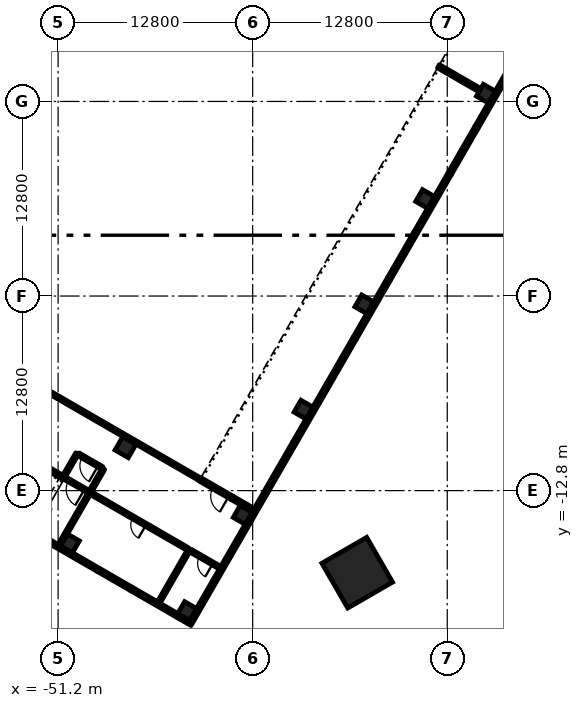
"""IFC4 building model, lengths in metres.
Left out: names, types, materials, properties, quantities, classifications, styles, units other than length and angle.
Written with IfcOpenShell. Run it as: python <this file> out.ifc"""

import sys

from ifc_helpers import new_model, si_unit, direction, frame, frame_2d, origin, origin_2d, place, context, subcontext, project, spatial, rectangle, extrude, element, fill, save


model = new_model("IFC4")
c1 = context("Model", 3, precision=1e-05, world=origin(), true_north=direction((0.0, 1.0)))
c2 = subcontext(c1, "Body", "Model", "MODEL_VIEW")
j1 = project(units=[si_unit("LENGTHUNIT", "METRE"), si_unit("PLANEANGLEUNIT", "RADIAN")], contexts=[c1])
p1 = place(None, origin())
s1 = spatial("IfcSite", under=j1, at=p1, CompositionType="ELEMENT")
p2 = place(p1, origin())
s2 = spatial("IfcBuilding", under=s1, at=p2, CompositionType="ELEMENT")
p3 = place(p2, origin())
s3 = spatial("IfcBuildingStorey", under=s2, at=p3, CompositionType="ELEMENT", Elevation=0.0)
p4 = place(p3, frame((-20.355, 10.597, 2.1), z_axis=(-0.191547193373, -0.34185939919, 0.920022730097), x_axis=(0.872390750772, -0.48880914268, 0.0)))
e1 = element("IfcColumn", 1, at=p4, inside=s3, PredefinedType="COLUMN", context=c2, shape_type="SweptSolid", body=[
    extrude(rectangle(XDim=1.8, YDim=1.6, at=origin_2d()), origin(), (0.0, 0.0, 1.0), 17.608),
])
p5 = place(p2, frame((0.0, 0.0, 11.4)))
s4 = spatial("IfcBuildingStorey", under=s2, at=p5, CompositionType="ELEMENT", Elevation=11.4)
p6 = place(p5, frame((-31.522, -18.199, 0.0), z_axis=(0.0, 0.0, 1.0), x_axis=(-0.866025403784, -0.5, 0.0)))
e2 = element("IfcColumn", 2, at=p6, inside=s4, PredefinedType="COLUMN", context=c2, shape_type="SweptSolid", body=[
    extrude(rectangle(XDim=3.4, YDim=3.4, at=origin_2d()), origin(), (0.0, 0.0, 1.0), 4.8),
])
for number, where, z_axis, x_axis in (
    (3, (-23.061, 13.314, 0.0), (0.0, 0.0, 1.0), (-0.5, -0.866, 0.0)),
    (4, (-27.061, 6.386, 0.0), (0.0, 0.0, 1.0), (-0.5, -0.866, 0.0)),
    (5, (-31.061, -0.542, 0.0), (0.0, 0.0, 1.0), (-0.5, -0.866, 0.0)),
    (6, (-35.061, -7.471, 0.0), (0.0, 0.0, 1.0), (-0.5, -0.866, 0.0)),
    (7, (-39.061, -14.399, 0.0), (0.0, 0.0, 1.0), (-0.5, -0.866, 0.0)),
):
    element("IfcColumn", number, at=place(p5, frame(where, z_axis=z_axis, x_axis=x_axis)), inside=s4, PredefinedType="COLUMN", context=c2, shape_type="SweptSolid", body=[
        extrude(rectangle(XDim=0.9, YDim=0.9, at=origin_2d()), origin(), (0.0, 0.0, 1.0), 4.8),
    ])
p7 = place(p5, frame((-46.768, -9.949, 0.0), z_axis=(0.0, 0.0, 1.0), x_axis=(-0.5, -0.866025403784, 0.0)))
e8 = element("IfcColumn", 8, at=p7, inside=s4, PredefinedType="COLUMN", context=c2, shape_type="SweptSolid", body=[
    extrude(rectangle(XDim=1.0, YDim=1.0, at=origin_2d()), origin(), (0.0, 0.0, 1.0), 4.8),
])
for number, where, z_axis, x_axis in (
    (9, (-42.71, -20.721, 0.0), (0.0, 0.0, 1.0), (-0.5, -0.866, 0.0)),
    (10, (-50.418, -16.271, 0.0), (0.0, 0.0, 1.0), (-0.5, -0.866, 0.0)),
):
    element("IfcColumn", number, at=place(p5, frame(where, z_axis=z_axis, x_axis=x_axis)), inside=s4, PredefinedType="COLUMN", context=c2, shape_type="SweptSolid", body=[
        extrude(rectangle(XDim=0.9, YDim=0.9, at=origin_2d()), origin(), (0.0, 0.0, 1.0), 4.8),
    ])
p8 = place(p5, frame((-21.438, 14.975, 0.0), z_axis=(0.0, 0.0, 1.0), x_axis=(-0.499990139034, -0.866031096941, 0.0)))
e11 = element("IfcWall", 11, at=p8, inside=s4, PredefinedType="SOLIDWALL", context=c2, shape_type="SweptSolid", body=[
    extrude(rectangle(XDim=4.5, YDim=0.25, at=frame_2d((2.25, 0.0))), origin(), (0.0, 0.0, 1.0), 4.5),
])
p9 = place(p5, frame((-23.688, 11.078, 0.0), z_axis=(0.0, 0.0, 1.0), x_axis=(-0.500010275428, -0.866019471182, 0.0)))
e12 = element("IfcWall", 12, at=p9, inside=s4, PredefinedType="SOLIDWALL", context=c2, shape_type="SweptSolid", body=[
    extrude(rectangle(XDim=3.5, YDim=0.25, at=frame_2d((1.75, 0.0))), origin(), (0.0, 0.0, 1.0), 4.5),
])
p10 = place(p9, frame((0.25, 0.0, 0.9)))
e13 = element("IfcOpeningElement", 13, at=p10, cuts=e12, PredefinedType="OPENING", context=c2, shape_type="SweptSolid", body=[
    extrude(rectangle(XDim=3.0, YDim=2.2, at=frame_2d((1.5, 1.1))), frame((0.0, 0.135, 0.0), z_axis=(0.0, -1.0, 0.0), x_axis=(1.0, 0.0, 0.0)), (0.0, 0.0, 1.0), 0.27),
])
p11 = place(p5, frame((-25.438, 8.047, 0.0), z_axis=(0.0, 0.0, 1.0), x_axis=(-0.499990139034, -0.866031096941, 0.0)))
e14 = element("IfcWall", 14, at=p11, inside=s4, PredefinedType="SOLIDWALL", context=c2, shape_type="SweptSolid", body=[
    extrude(rectangle(XDim=4.5, YDim=0.25, at=frame_2d((2.25, 0.0))), origin(), (0.0, 0.0, 1.0), 4.5),
])
p12 = place(p5, frame((-27.688, 4.15, 0.0), z_axis=(0.0, 0.0, 1.0), x_axis=(-0.500010275428, -0.866019471182, 0.0)))
e15 = element("IfcWall", 15, at=p12, inside=s4, PredefinedType="SOLIDWALL", context=c2, shape_type="SweptSolid", body=[
    extrude(rectangle(XDim=3.5, YDim=0.25, at=frame_2d((1.75, 0.0))), origin(), (0.0, 0.0, 1.0), 4.5),
])
p13 = place(p12, frame((0.25, 0.0, 0.9)))
e16 = element("IfcOpeningElement", 16, at=p13, cuts=e15, PredefinedType="OPENING", context=c2, shape_type="SweptSolid", body=[
    extrude(rectangle(XDim=3.0, YDim=2.2, at=frame_2d((1.5, 1.1))), frame((0.0, 0.135, 0.0), z_axis=(0.0, -1.0, 0.0), x_axis=(1.0, 0.0, 0.0)), (0.0, 0.0, 1.0), 0.27),
])
p14 = place(p5, frame((-29.438, 1.119, 0.0), z_axis=(0.0, 0.0, 1.0), x_axis=(-0.499990139034, -0.866031096941, 0.0)))
e17 = element("IfcWall", 17, at=p14, inside=s4, PredefinedType="SOLIDWALL", context=c2, shape_type="SweptSolid", body=[
    extrude(rectangle(XDim=4.5, YDim=0.25, at=frame_2d((2.25, 0.0))), origin(), (0.0, 0.0, 1.0), 4.5),
])
p15 = place(p5, frame((-31.688, -2.779, 0.0), z_axis=(0.0, 0.0, 1.0), x_axis=(-0.500010275428, -0.866019471182, 0.0)))
e18 = element("IfcWall", 18, at=p15, inside=s4, PredefinedType="SOLIDWALL", context=c2, shape_type="SweptSolid", body=[
    extrude(rectangle(XDim=3.5, YDim=0.25, at=frame_2d((1.75, 0.0))), origin(), (0.0, 0.0, 1.0), 4.5),
])
p16 = place(p15, frame((0.25, 0.0, 0.9)))
e19 = element("IfcOpeningElement", 19, at=p16, cuts=e18, PredefinedType="OPENING", context=c2, shape_type="SweptSolid", body=[
    extrude(rectangle(XDim=3.0, YDim=2.2, at=frame_2d((1.5, 1.1))), frame((0.0, 0.135, 0.0), z_axis=(0.0, -1.0, 0.0), x_axis=(1.0, 0.0, 0.0)), (0.0, 0.0, 1.0), 0.27),
])
p17 = place(p5, frame((-33.438, -5.81, 0.0), z_axis=(0.0, 0.0, 1.0), x_axis=(-0.499990705068, -0.866030770149, 0.0)))
e20 = element("IfcWall", 20, at=p17, inside=s4, PredefinedType="SOLIDWALL", context=c2, shape_type="SweptSolid", body=[
    extrude(rectangle(XDim=4.438, YDim=0.25, at=frame_2d((2.219, 0.0))), origin(), (0.0, 0.0, 1.0), 4.5),
])
p18 = place(p5, frame((-35.656, -9.653, 0.0), z_axis=(0.0, 0.0, 1.0), x_axis=(-0.500010275428, -0.866019471182, 0.0)))
e21 = element("IfcWall", 21, at=p18, inside=s4, PredefinedType="SOLIDWALL", context=c2, shape_type="SweptSolid", body=[
    extrude(rectangle(XDim=3.5, YDim=0.25, at=frame_2d((1.75, 0.0))), origin(), (0.0, 0.0, 1.0), 4.5),
])
p19 = place(p18, frame((0.25, 0.0, 0.9)))
e22 = element("IfcOpeningElement", 22, at=p19, cuts=e21, PredefinedType="OPENING", context=c2, shape_type="SweptSolid", body=[
    extrude(rectangle(XDim=3.0, YDim=2.2, at=frame_2d((1.5, 1.1))), frame((0.0, 0.135, 0.0), z_axis=(0.0, -1.0, 0.0), x_axis=(1.0, 0.0, 0.0)), (0.0, 0.0, 1.0), 0.27),
])
p20 = place(p5, frame((-37.406, -12.684, 0.0), z_axis=(0.0, 0.0, 1.0), x_axis=(-0.500001855621, -0.866024332438, 0.0)))
e23 = element("IfcWall", 23, at=p20, inside=s4, PredefinedType="SOLIDWALL", context=c2, shape_type="SweptSolid", body=[
    extrude(rectangle(XDim=10.312, YDim=0.25, at=frame_2d((5.156, 0.0))), origin(), (0.0, 0.0, 1.0), 4.5),
])
p21 = place(p5, frame((-42.608, -21.444, 0.0), z_axis=(0.0, 0.0, 1.0), x_axis=(-0.866022959057, 0.500004234368, 0.0)))
e24 = element("IfcWall", 24, at=p21, inside=s4, PredefinedType="SOLIDWALL", context=c2, shape_type="SweptSolid", body=[
    extrude(rectangle(XDim=4.375, YDim=0.25, at=frame_2d((2.188, 0.0))), origin(), (0.0, 0.0, 1.0), 4.5),
])
p22 = place(p5, frame((-46.397, -19.256, 0.0), z_axis=(0.0, 0.0, 1.0), x_axis=(-0.866022959057, 0.500004234368, 0.0)))
e25 = element("IfcWall", 25, at=p22, inside=s4, PredefinedType="SOLIDWALL", context=c2, shape_type="SweptSolid", body=[
    extrude(rectangle(XDim=2.5, YDim=0.25, at=frame_2d((1.25, 0.0))), origin(), (0.0, 0.0, 1.0), 4.5),
])
p23 = place(p22, frame((0.25, 0.0, 0.9)))
e26 = element("IfcOpeningElement", 26, at=p23, cuts=e25, PredefinedType="OPENING", context=c2, shape_type="SweptSolid", body=[
    extrude(rectangle(XDim=2.0, YDim=1.8, at=frame_2d((1.0, 0.9))), frame((0.0, 0.135, 0.0), z_axis=(0.0, -1.0, 0.0), x_axis=(1.0, 0.0, 0.0)), (0.0, 0.0, 1.0), 0.27),
])
p24 = place(p5, frame((-48.562, -18.006, 0.0), z_axis=(0.0, 0.0, 1.0), x_axis=(-0.866027159341, 0.499996959274, 0.0)))
e27 = element("IfcWall", 27, at=p24, inside=s4, PredefinedType="SOLIDWALL", context=c2, shape_type="SweptSolid", body=[
    extrude(rectangle(XDim=11.625, YDim=0.25, at=frame_2d((5.812, 0.0))), origin(), (0.0, 0.0, 1.0), 4.5),
])
p25 = place(p5, frame((-49.119, -12.921, 0.0), z_axis=(0.0, 0.0, 1.0), x_axis=(-0.49999894854, -0.866026010844, 0.0)))
e28 = element("IfcWall", 28, at=p25, inside=s4, PredefinedType="SOLIDWALL", context=c2, shape_type="SweptSolid", body=[
    extrude(rectangle(XDim=4.0, YDim=0.2, at=frame_2d((2.0, 0.0))), origin(), (0.0, 0.0, 1.0), 4.5),
])
p26 = place(p5, frame((-49.206, -12.871, 0.0), z_axis=(0.0, 0.0, 1.0), x_axis=(-0.866036909293, 0.499980071345, 0.0)))
e29 = element("IfcWall", 29, at=p26, inside=s4, PredefinedType="SOLIDWALL", context=c2, shape_type="SweptSolid", body=[
    extrude(rectangle(XDim=1.75, YDim=0.2, at=frame_2d((0.875, 0.0))), origin(), (0.0, 0.0, 1.0), 4.5),
])
p27 = place(p26, frame((0.3, 0.0, 0.0)))
e30 = element("IfcOpeningElement", 30, at=p27, cuts=e29, PredefinedType="OPENING", context=c2, shape_type="SweptSolid", body=[
    extrude(rectangle(XDim=1.2, YDim=2.1, at=frame_2d((0.6, 1.05))), frame((0.0, 0.11, 0.0), z_axis=(0.0, -1.0, 0.0), x_axis=(1.0, 0.0, 0.0)), (0.0, 0.0, 1.0), 0.22),
])
p28 = place(p5, frame((-50.722, -11.996, 0.0), z_axis=(0.0, 0.0, 1.0), x_axis=(-0.866027239912, 0.49999681972, 0.0)))
e31 = element("IfcWall", 31, at=p28, inside=s4, PredefinedType="SOLIDWALL", context=c2, shape_type="SweptSolid", body=[
    extrude(rectangle(XDim=6.65, YDim=0.2, at=frame_2d((3.325, 0.0))), origin(), (0.0, 0.0, 1.0), 4.5),
])
for number, where, z_axis, x_axis in (
    (32, (-48.219, -11.363, 0.0), (0.0, 0.0, 1.0), (-0.5, -0.866, 0.0)),
    (33, (-49.951, -10.363, 0.0), (0.0, 0.0, 1.0), (-0.5, -0.866, 0.0)),
):
    element("IfcWall", number, at=place(p5, frame(where, z_axis=z_axis, x_axis=x_axis)), inside=s4, PredefinedType="PARTITIONING", context=c2, shape_type="SweptSolid", body=[
        extrude(rectangle(XDim=1.7, YDim=0.2, at=frame_2d((0.85, 0.0))), origin(), (0.0, 0.0, 1.0), 3.9),
    ])
p29 = place(p5, frame((-48.306, -11.312, 0.0), z_axis=(0.0, 0.0, 1.0), x_axis=(-0.866047807691, 0.499961193289, 0.0)))
e34 = element("IfcWall", 34, at=p29, inside=s4, PredefinedType="PARTITIONING", context=c2, shape_type="SweptSolid", body=[
    extrude(rectangle(XDim=1.8, YDim=0.2, at=frame_2d((0.9, 0.0))), origin(), (0.0, 0.0, 1.0), 3.9),
])
p30 = place(p29, frame((0.3, 0.0, 0.0)))
e35 = element("IfcOpeningElement", 35, at=p30, cuts=e34, PredefinedType="OPENING", context=c2, shape_type="SweptSolid", body=[
    extrude(rectangle(XDim=1.2, YDim=2.1, at=frame_2d((0.6, 1.05))), frame((0.0, 0.11, 0.0), z_axis=(0.0, -1.0, 0.0), x_axis=(1.0, 0.0, 0.0)), (0.0, 0.0, 1.0), 0.22),
])
p31 = place(p5, frame((-23.45, 13.539, 0.0), z_axis=(0.0, 0.0, 1.0), x_axis=(-0.866035871367, 0.499981869177, 0.0)))
e36 = element("IfcWall", 36, at=p31, inside=s4, PredefinedType="SOLIDWALL", context=c2, shape_type="SweptSolid", body=[
    extrude(rectangle(XDim=3.15, YDim=0.25, at=frame_2d((1.575, 0.0))), origin(), (0.0, 0.0, 1.0), 3.9),
])
p32 = place(p5, frame((-38.358, -14.083, 0.0), z_axis=(0.0, 0.0, 1.0), x_axis=(-0.866055983265, 0.499947031044, 0.0)))
e37 = element("IfcWall", 37, at=p32, inside=s4, PredefinedType="SOLIDWALL", context=c2, shape_type="SweptSolid", body=[
    extrude(rectangle(XDim=1.6, YDim=0.25, at=frame_2d((0.8, 0.0))), origin(), (0.0, 0.0, 1.0), 3.9),
])
p33 = place(p5, frame((-39.744, -13.283, 0.0), z_axis=(0.0, 0.0, 1.0), x_axis=(-0.866014668023, 0.500018594424, 0.0)))
e38 = element("IfcWall", 38, at=p33, inside=s4, PredefinedType="SOLIDWALL", context=c2, shape_type="SweptSolid", body=[
    extrude(rectangle(XDim=2.45, YDim=0.25, at=frame_2d((1.225, 0.0))), origin(), (0.0, 0.0, 1.0), 3.9),
])
p34 = place(p33, frame((0.25, 0.0, 0.0)))
e39 = element("IfcOpeningElement", 39, at=p34, cuts=e38, PredefinedType="OPENING", context=c2, shape_type="SweptSolid", body=[
    extrude(rectangle(XDim=1.2, YDim=2.1, at=frame_2d((0.6, 1.05))), frame((0.0, 0.135, 0.0), z_axis=(0.0, -1.0, 0.0), x_axis=(1.0, 0.0, 0.0)), (0.0, 0.0, 1.0), 0.27),
])
p35 = place(p5, frame((-42.581, -16.696, 0.0), z_axis=(0.0, 0.0, 1.0), x_axis=(-0.49999894854, -0.866026010844, 0.0)))
e40 = element("IfcWall", 40, at=p35, inside=s4, PredefinedType="PARTITIONING", context=c2, shape_type="SweptSolid", body=[
    extrude(rectangle(XDim=4.0, YDim=0.2, at=frame_2d((2.0, 0.0))), origin(), (0.0, 0.0, 1.0), 3.9),
])
p36 = place(p5, frame((-40.546, -17.871, 0.0), z_axis=(0.0, 0.0, 1.0), x_axis=(-0.866017533419, 0.500013631625, 0.0)))
e41 = element("IfcWall", 41, at=p36, inside=s4, PredefinedType="PARTITIONING", context=c2, shape_type="SweptSolid", body=[
    extrude(rectangle(XDim=2.25, YDim=0.2, at=frame_2d((1.125, 0.0))), origin(), (0.0, 0.0, 1.0), 3.9),
])
p37 = place(p36, frame((0.55, 0.0, 0.0)))
e42 = element("IfcOpeningElement", 42, at=p37, cuts=e41, PredefinedType="OPENING", context=c2, shape_type="SweptSolid", body=[
    extrude(rectangle(XDim=1.0, YDim=2.1, at=frame_2d((0.5, 1.05))), frame((0.0, 0.11, 0.0), z_axis=(0.0, -1.0, 0.0), x_axis=(1.0, 0.0, 0.0)), (0.0, 0.0, 1.0), 0.22),
])
p38 = place(p5, frame((-42.667, -16.646, 0.0), z_axis=(0.0, 0.0, 1.0), x_axis=(-0.86601045545, 0.500025890382, 0.0)))
e43 = element("IfcWall", 43, at=p38, inside=s4, PredefinedType="PARTITIONING", context=c2, shape_type="SweptSolid", body=[
    extrude(rectangle(XDim=2.925, YDim=0.2, at=frame_2d((1.462, 0.0))), origin(), (0.0, 0.0, 1.0), 3.9),
])
p39 = place(p5, frame((-45.201, -15.184, 0.0), z_axis=(0.0, 0.0, 1.0), x_axis=(-0.866031096941, 0.499990139034, 0.0)))
e44 = element("IfcWall", 44, at=p39, inside=s4, PredefinedType="PARTITIONING", context=c2, shape_type="SweptSolid", body=[
    extrude(rectangle(XDim=1.5, YDim=0.2, at=frame_2d((0.75, 0.0))), origin(), (0.0, 0.0, 1.0), 3.9),
])
p40 = place(p39, frame((0.25, 0.0, 0.0)))
e45 = element("IfcOpeningElement", 45, at=p40, cuts=e44, PredefinedType="OPENING", context=c2, shape_type="SweptSolid", body=[
    extrude(rectangle(XDim=1.0, YDim=2.1, at=frame_2d((0.5, 1.05))), frame((0.0, 0.11, 0.0), z_axis=(0.0, -1.0, 0.0), x_axis=(1.0, 0.0, 0.0)), (0.0, 0.0, 1.0), 0.22),
])
p41 = place(p5, frame((-46.5, -14.434, 0.0), z_axis=(0.0, 0.0, 1.0), x_axis=(-0.866046596414, 0.499963291492, 0.0)))
e46 = element("IfcWall", 46, at=p41, inside=s4, PredefinedType="PARTITIONING", context=c2, shape_type="SweptSolid", body=[
    extrude(rectangle(XDim=2.925, YDim=0.2, at=frame_2d((1.462, 0.0))), origin(), (0.0, 0.0, 1.0), 3.9),
])
p42 = place(p5, frame((-41.866, -12.058, 0.0), z_axis=(0.0, 0.0, 1.0), x_axis=(-0.866025540551, 0.499999763114, 0.0)))
e47 = element("IfcWall", 47, at=p42, inside=s4, PredefinedType="PARTITIONING", context=c2, shape_type="SweptSolid", body=[
    extrude(rectangle(XDim=39.4, YDim=0.2, at=frame_2d((19.7, 0.0))), origin(), (0.0, 0.0, 1.0), 3.9),
])
p43 = place(p10, origin())
e48 = element("IfcWindow", 48, at=p43, inside=s4, PartitioningType="SINGLE_PANEL", PredefinedType="WINDOW", context=c2, shape_type="SweptSolid", body=[
    extrude(rectangle(XDim=3.0, YDim=2.2, at=frame_2d((1.5, 1.1))), frame((0.0, 0.03, 0.0), z_axis=(0.0, -1.0, 0.0), x_axis=(1.0, 0.0, 0.0)), (0.0, 0.0, 1.0), 0.06),
])
fill(e13, e48)
p44 = place(p13, origin())
e49 = element("IfcWindow", 49, at=p44, inside=s4, PartitioningType="SINGLE_PANEL", PredefinedType="WINDOW", context=c2, shape_type="SweptSolid", body=[
    extrude(rectangle(XDim=3.0, YDim=2.2, at=frame_2d((1.5, 1.1))), frame((0.0, 0.03, 0.0), z_axis=(0.0, -1.0, 0.0), x_axis=(1.0, 0.0, 0.0)), (0.0, 0.0, 1.0), 0.06),
])
fill(e16, e49)
p45 = place(p16, origin())
e50 = element("IfcWindow", 50, at=p45, inside=s4, PartitioningType="SINGLE_PANEL", PredefinedType="WINDOW", context=c2, shape_type="SweptSolid", body=[
    extrude(rectangle(XDim=3.0, YDim=2.2, at=frame_2d((1.5, 1.1))), frame((0.0, 0.03, 0.0), z_axis=(0.0, -1.0, 0.0), x_axis=(1.0, 0.0, 0.0)), (0.0, 0.0, 1.0), 0.06),
])
fill(e19, e50)
p46 = place(p19, origin())
e51 = element("IfcWindow", 51, at=p46, inside=s4, PartitioningType="SINGLE_PANEL", PredefinedType="WINDOW", context=c2, shape_type="SweptSolid", body=[
    extrude(rectangle(XDim=3.0, YDim=2.2, at=frame_2d((1.5, 1.1))), frame((0.0, 0.03, 0.0), z_axis=(0.0, -1.0, 0.0), x_axis=(1.0, 0.0, 0.0)), (0.0, 0.0, 1.0), 0.06),
])
fill(e22, e51)
p47 = place(p23, origin())
e52 = element("IfcWindow", 52, at=p47, inside=s4, PartitioningType="SINGLE_PANEL", PredefinedType="WINDOW", context=c2, shape_type="SweptSolid", body=[
    extrude(rectangle(XDim=2.0, YDim=1.8, at=frame_2d((1.0, 0.9))), frame((0.0, 0.03, 0.0), z_axis=(0.0, -1.0, 0.0), x_axis=(1.0, 0.0, 0.0)), (0.0, 0.0, 1.0), 0.06),
])
fill(e26, e52)
p48 = place(p27, origin())
e53 = element("IfcDoor", 53, at=p48, inside=s4, OperationType="SINGLE_SWING_LEFT", PredefinedType="DOOR", context=c2, shape_type="SweptSolid", body=[
    extrude(rectangle(XDim=1.2, YDim=2.1, at=frame_2d((0.6, 1.05))), frame((0.0, 0.025, 0.0), z_axis=(0.0, -1.0, 0.0), x_axis=(1.0, 0.0, 0.0)), (0.0, 0.0, 1.0), 0.05),
])
fill(e30, e53)
p49 = place(p30, origin())
e54 = element("IfcDoor", 54, at=p49, inside=s4, OperationType="SINGLE_SWING_LEFT", PredefinedType="DOOR", context=c2, shape_type="SweptSolid", body=[
    extrude(rectangle(XDim=1.2, YDim=2.1, at=frame_2d((0.6, 1.05))), frame((0.0, 0.025, 0.0), z_axis=(0.0, -1.0, 0.0), x_axis=(1.0, 0.0, 0.0)), (0.0, 0.0, 1.0), 0.05),
])
fill(e35, e54)
p50 = place(p34, origin())
e55 = element("IfcDoor", 55, at=p50, inside=s4, OperationType="SINGLE_SWING_LEFT", PredefinedType="DOOR", context=c2, shape_type="SweptSolid", body=[
    extrude(rectangle(XDim=1.2, YDim=2.1, at=frame_2d((0.6, 1.05))), frame((0.0, 0.025, 0.0), z_axis=(0.0, -1.0, 0.0), x_axis=(1.0, 0.0, 0.0)), (0.0, 0.0, 1.0), 0.05),
])
fill(e39, e55)
p51 = place(p37, origin())
e56 = element("IfcDoor", 56, at=p51, inside=s4, OperationType="SINGLE_SWING_LEFT", PredefinedType="DOOR", context=c2, shape_type="SweptSolid", body=[
    extrude(rectangle(XDim=1.0, YDim=2.1, at=frame_2d((0.5, 1.05))), frame((0.0, 0.025, 0.0), z_axis=(0.0, -1.0, 0.0), x_axis=(1.0, 0.0, 0.0)), (0.0, 0.0, 1.0), 0.05),
])
fill(e42, e56)
p52 = place(p40, origin())
e57 = element("IfcDoor", 57, at=p52, inside=s4, OperationType="SINGLE_SWING_LEFT", PredefinedType="DOOR", context=c2, shape_type="SweptSolid", body=[
    extrude(rectangle(XDim=1.0, YDim=2.1, at=frame_2d((0.5, 1.05))), frame((0.0, 0.025, 0.0), z_axis=(0.0, -1.0, 0.0), x_axis=(1.0, 0.0, 0.0)), (0.0, 0.0, 1.0), 0.05),
])
fill(e45, e57)
save(model, sys.argv[1])
